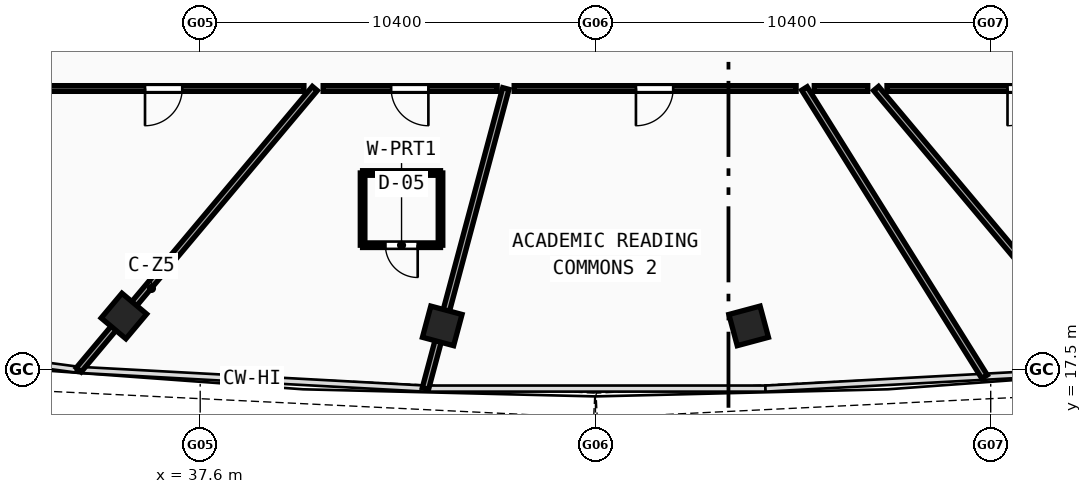
"""IFC4 building model, lengths in metres.
Left out: names, types, materials, properties, quantities, classifications, styles, units other than length and angle.
Written with IfcOpenShell. Run it as: python <this file> out.ifc"""

import sys

from ifc_helpers import new_model, si_unit, direction, frame, frame_2d, origin, origin_with_axes, origin_2d, place, context, subcontext, project, spatial, rectangle, hollow_rectangle, extrude, source, transform, mapped, element, fill, save


model = new_model("IFC4")
c1 = context("Model", 3, precision=1e-05, world=origin(), true_north=direction((0.0, 1.0)))
c2 = subcontext(c1, "Body", "Model", "MODEL_VIEW")
j1 = project(units=[si_unit("LENGTHUNIT", "METRE"), si_unit("PLANEANGLEUNIT", "RADIAN")], contexts=[c1])
p1 = place(None, origin())
s1 = spatial("IfcSite", under=j1, at=p1, CompositionType="ELEMENT")
p2 = place(p1, origin())
s2 = spatial("IfcBuilding", under=s1, at=p2, CompositionType="ELEMENT")
p3 = place(p2, frame((0.0, 0.0, 251.99)))
s3 = spatial("IfcBuildingStorey", under=s2, at=p3, CompositionType="ELEMENT", Elevation=251.99)
m1 = source(origin(), c2, "Body", "SweptSolid", [
    extrude(hollow_rectangle(XDim=0.85, YDim=0.85, WallThickness=0.034, at=origin_2d()), origin(), (0.0, 0.0, 1.0), 3.73),
])
for number, where, z_axis, x_axis in (
    (1, (35.593, 18.914, -0.26), (0.0, 0.0, 1.0), (0.766, -0.643, 0.0)),
    (2, (43.969, 18.654, -0.26), (0.0, 0.0, 1.0), (0.966, -0.259, 0.0)),
    (3, (52.031, 18.654, -0.26), (0.0, 0.0, 1.0), (0.966, 0.259, 0.0)),
):
    element("IfcColumn", number, at=place(p3, frame(where, z_axis=z_axis, x_axis=x_axis)), inside=s3, PredefinedType="COLUMN", context=c2, shape_type="MappedRepresentation", body=[
        mapped(m1, transform((0.0, 0.0, 0.0), scale=1.0)),
    ])
p4 = place(p3, frame((40.616, 24.9, 0.0), z_axis=(0.0, 0.0, 1.0), x_axis=(-0.642795010628, -0.766038232931, 0.0)))
e4 = element("IfcWall", 4, at=p4, inside=s3, PredefinedType="PARTITIONING", context=c2, shape_type="SweptSolid", body=[
    extrude(rectangle(XDim=9.663, YDim=0.17, at=frame_2d((4.832, 0.0))), origin(), (0.0, 0.0, 1.0), 2.82),
])
p5 = place(p3, frame((45.642, 24.9, 0.0), z_axis=(0.0, 0.0, 1.0), x_axis=(-0.258833622746, -0.965921920103, 0.0)))
e5 = element("IfcWall", 5, at=p5, inside=s3, PredefinedType="PARTITIONING", context=c2, shape_type="SweptSolid", body=[
    extrude(rectangle(XDim=8.174, YDim=0.17, at=frame_2d((4.087, 0.0))), origin(), (0.0, 0.0, 1.0), 2.82),
])
p6 = place(p3, frame((53.499, 24.9, 0.0), z_axis=(0.0, 0.0, 1.0), x_axis=(0.529920411872, -0.848047379031, 0.0)))
e6 = element("IfcWall", 6, at=p6, inside=s3, PredefinedType="PARTITIONING", context=c2, shape_type="SweptSolid", body=[
    extrude(rectangle(XDim=8.943, YDim=0.17, at=frame_2d((4.471, 0.0))), origin(), (0.0, 0.0, 1.0), 2.82),
])
p7 = place(p3, frame((55.384, 24.9, 0.0), z_axis=(0.0, 0.0, 1.0), x_axis=(0.642795010628, -0.766038232931, 0.0)))
e7 = element("IfcWall", 7, at=p7, inside=s3, PredefinedType="PARTITIONING", context=c2, shape_type="SweptSolid", body=[
    extrude(rectangle(XDim=9.663, YDim=0.17, at=frame_2d((4.832, 0.0))), origin(), (0.0, 0.0, 1.0), 2.82),
])
p8 = place(p3, frame((62.85, 24.9, 0.0), z_axis=(0.0, 0.0, 1.0), x_axis=(-1.0, 0.0, 0.0)))
e8 = element("IfcWall", 8, at=p8, inside=s3, PredefinedType="PARTITIONING", context=c2, shape_type="SweptSolid", body=[
    extrude(rectangle(XDim=7.179, YDim=0.15, at=frame_2d((3.589, 0.0))), origin(), (0.0, 0.0, 1.0), 3.12),
])
p9 = place(p8, frame((3.028, 0.0, 0.0)))
e9 = element("IfcOpeningElement", 9, at=p9, cuts=e8, PredefinedType="OPENING", context=c2, shape_type="SweptSolid", body=[
    extrude(rectangle(XDim=0.98, YDim=2.12, at=frame_2d((0.49, 1.06))), frame((0.0, 0.085, 0.0), z_axis=(0.0, -1.0, 0.0), x_axis=(1.0, 0.0, 0.0)), (0.0, 0.0, 1.0), 0.17),
])
p10 = place(p3, frame((55.164, 24.9, 0.0), z_axis=(0.0, 0.0, 1.0), x_axis=(-1.0, 0.0, 0.0)))
e10 = element("IfcWall", 10, at=p10, inside=s3, PredefinedType="PARTITIONING", context=c2, shape_type="SweptSolid", body=[
    extrude(rectangle(XDim=1.406, YDim=0.15, at=frame_2d((0.703, 0.0))), origin(), (0.0, 0.0, 1.0), 2.82),
])
p11 = place(p3, frame((53.279, 24.9, 0.0), z_axis=(0.0, 0.0, 1.0), x_axis=(-1.0, 0.0, 0.0)))
e11 = element("IfcWall", 11, at=p11, inside=s3, PredefinedType="PARTITIONING", context=c2, shape_type="SweptSolid", body=[
    extrude(rectangle(XDim=7.417, YDim=0.15, at=frame_2d((3.708, 0.0))), origin(), (0.0, 0.0, 1.0), 2.82),
])
p12 = place(p11, frame((3.234, 0.0, 0.0)))
e12 = element("IfcOpeningElement", 12, at=p12, cuts=e11, PredefinedType="OPENING", context=c2, shape_type="SweptSolid", body=[
    extrude(rectangle(XDim=0.98, YDim=2.12, at=frame_2d((0.49, 1.06))), frame((0.0, 0.085, 0.0), z_axis=(0.0, -1.0, 0.0), x_axis=(1.0, 0.0, 0.0)), (0.0, 0.0, 1.0), 0.17),
])
p13 = place(p3, frame((45.414, 24.9, 0.0), z_axis=(0.0, 0.0, 1.0), x_axis=(-1.0, 0.0, 0.0)))
e13 = element("IfcWall", 13, at=p13, inside=s3, PredefinedType="PARTITIONING", context=c2, shape_type="SweptSolid", body=[
    extrude(rectangle(XDim=4.579, YDim=0.15, at=frame_2d((2.289, 0.0))), origin(), (0.0, 0.0, 1.0), 2.82),
])
p14 = place(p13, frame((1.81, 0.0, 0.0)))
e14 = element("IfcOpeningElement", 14, at=p14, cuts=e13, PredefinedType="OPENING", context=c2, shape_type="SweptSolid", body=[
    extrude(rectangle(XDim=0.98, YDim=2.12, at=frame_2d((0.49, 1.06))), frame((0.0, 0.085, 0.0), z_axis=(0.0, -1.0, 0.0), x_axis=(1.0, 0.0, 0.0)), (0.0, 0.0, 1.0), 0.17),
])
p15 = place(p3, frame((40.329, 24.9, 0.0), z_axis=(0.0, 0.0, 1.0), x_axis=(-1.0, 0.0, 0.0)))
e15 = element("IfcWall", 15, at=p15, inside=s3, PredefinedType="PARTITIONING", context=c2, shape_type="SweptSolid", body=[
    extrude(rectangle(XDim=7.179, YDim=0.15, at=frame_2d((3.589, 0.0))), origin(), (0.0, 0.0, 1.0), 3.12),
])
p16 = place(p15, frame((3.201, 0.0, 0.0)))
e16 = element("IfcOpeningElement", 16, at=p16, cuts=e15, PredefinedType="OPENING", context=c2, shape_type="SweptSolid", body=[
    extrude(rectangle(XDim=0.98, YDim=2.12, at=frame_2d((0.49, 1.06))), frame((0.0, 0.085, 0.0), z_axis=(0.0, -1.0, 0.0), x_axis=(1.0, 0.0, 0.0)), (0.0, 0.0, 1.0), 0.17),
])
p17 = place(p3, frame((41.873, 20.777, 0.0), z_axis=(0.0, 0.0, 1.0), x_axis=(1.0, 0.0, 0.0)))
e17 = element("IfcWall", 17, at=p17, inside=s3, PredefinedType="PARTITIONING", context=c2, shape_type="SweptSolid", body=[
    extrude(rectangle(XDim=2.05, YDim=0.12, at=frame_2d((1.025, 0.0))), origin(), (0.0, 0.0, 1.0), 3.47),
])
p18 = place(p17, frame((0.6, 0.0, 0.0)))
e18 = element("IfcOpeningElement", 18, at=p18, cuts=e17, PredefinedType="OPENING", context=c2, shape_type="SweptSolid", body=[
    extrude(rectangle(XDim=0.85, YDim=2.1, at=frame_2d((0.425, 1.05))), frame((0.0, 0.07, 0.0), z_axis=(0.0, -1.0, 0.0), x_axis=(1.0, 0.0, 0.0)), (0.0, 0.0, 1.0), 0.14),
])
p19 = place(p3, frame((43.923, 20.777, 0.0), z_axis=(0.0, 0.0, 1.0), x_axis=(0.0, 1.0, 0.0)))
e19 = element("IfcWall", 19, at=p19, inside=s3, PredefinedType="PARTITIONING", context=c2, shape_type="SweptSolid", body=[
    extrude(rectangle(XDim=1.9, YDim=0.12, at=frame_2d((0.95, 0.0))), origin(), (0.0, 0.0, 1.0), 3.12),
])
p20 = place(p3, frame((43.923, 22.677, 0.0), z_axis=(0.0, 0.0, 1.0), x_axis=(-1.0, 0.0, 0.0)))
e20 = element("IfcWall", 20, at=p20, inside=s3, PredefinedType="PARTITIONING", context=c2, shape_type="SweptSolid", body=[
    extrude(rectangle(XDim=2.05, YDim=0.12, at=frame_2d((1.025, 0.0))), origin(), (0.0, 0.0, 1.0), 3.47),
])
p21 = place(p3, frame((41.873, 22.677, 0.0), z_axis=(0.0, 0.0, 1.0), x_axis=(0.0, -1.0, 0.0)))
e21 = element("IfcWall", 21, at=p21, inside=s3, PredefinedType="PARTITIONING", context=c2, shape_type="SweptSolid", body=[
    extrude(rectangle(XDim=1.9, YDim=0.12, at=frame_2d((0.95, 0.0))), origin(), (0.0, 0.0, 1.0), 3.12),
])
m2 = source(origin(), c2, "Body", "SweptSolid", [
    extrude(rectangle(XDim=0.98, YDim=2.12, at=frame_2d((0.49, 1.06))), frame((0.0, 0.025, 0.0), z_axis=(0.0, -1.0, 0.0), x_axis=(1.0, 0.0, 0.0)), (0.0, 0.0, 1.0), 0.05),
])
p22 = place(p16, origin_with_axes())
e22 = element("IfcDoor", 22, at=p22, inside=s3, OperationType="SINGLE_SWING_RIGHT", PredefinedType="DOOR", context=c2, shape_type="MappedRepresentation", body=[
    mapped(m2, transform((0.0, 0.0, 0.0), scale=1.0)),
])
fill(e16, e22)
p23 = place(p14, origin_with_axes())
e23 = element("IfcDoor", 23, at=p23, inside=s3, OperationType="SINGLE_SWING_LEFT", PredefinedType="DOOR", context=c2, shape_type="MappedRepresentation", body=[
    mapped(m2, transform((0.0, 0.0, 0.0), scale=1.0)),
])
fill(e14, e23)
m3 = source(origin(), c2, "Body", "SweptSolid", [
    extrude(rectangle(XDim=0.85, YDim=2.1, at=frame_2d((0.425, 1.05))), frame((0.0, 0.025, 0.0), z_axis=(0.0, -1.0, 0.0), x_axis=(1.0, 0.0, 0.0)), (0.0, 0.0, 1.0), 0.05),
])
p24 = place(p18, frame((0.85, 0.0, 0.0), z_axis=(0.0, 0.0, 1.0), x_axis=(-1.0, 0.0, 0.0)))
e24 = element("IfcDoor", 24, at=p24, inside=s3, OperationType="SINGLE_SWING_LEFT", PredefinedType="DOOR", context=c2, shape_type="MappedRepresentation", body=[
    mapped(m3, transform((0.0, 0.0, 0.0), scale=1.0)),
])
fill(e18, e24)
p25 = place(p12, origin_with_axes())
e25 = element("IfcDoor", 25, at=p25, inside=s3, OperationType="SINGLE_SWING_RIGHT", PredefinedType="DOOR", context=c2, shape_type="MappedRepresentation", body=[
    mapped(m2, transform((0.0, 0.0, 0.0), scale=1.0)),
])
fill(e12, e25)
p26 = place(p9, origin_with_axes())
e26 = element("IfcDoor", 26, at=p26, inside=s3, OperationType="SINGLE_SWING_RIGHT", PredefinedType="DOOR", context=c2, shape_type="MappedRepresentation", body=[
    mapped(m2, transform((0.0, 0.0, 0.0), scale=1.0)),
])
fill(e9, e26)
save(model, sys.argv[1])
